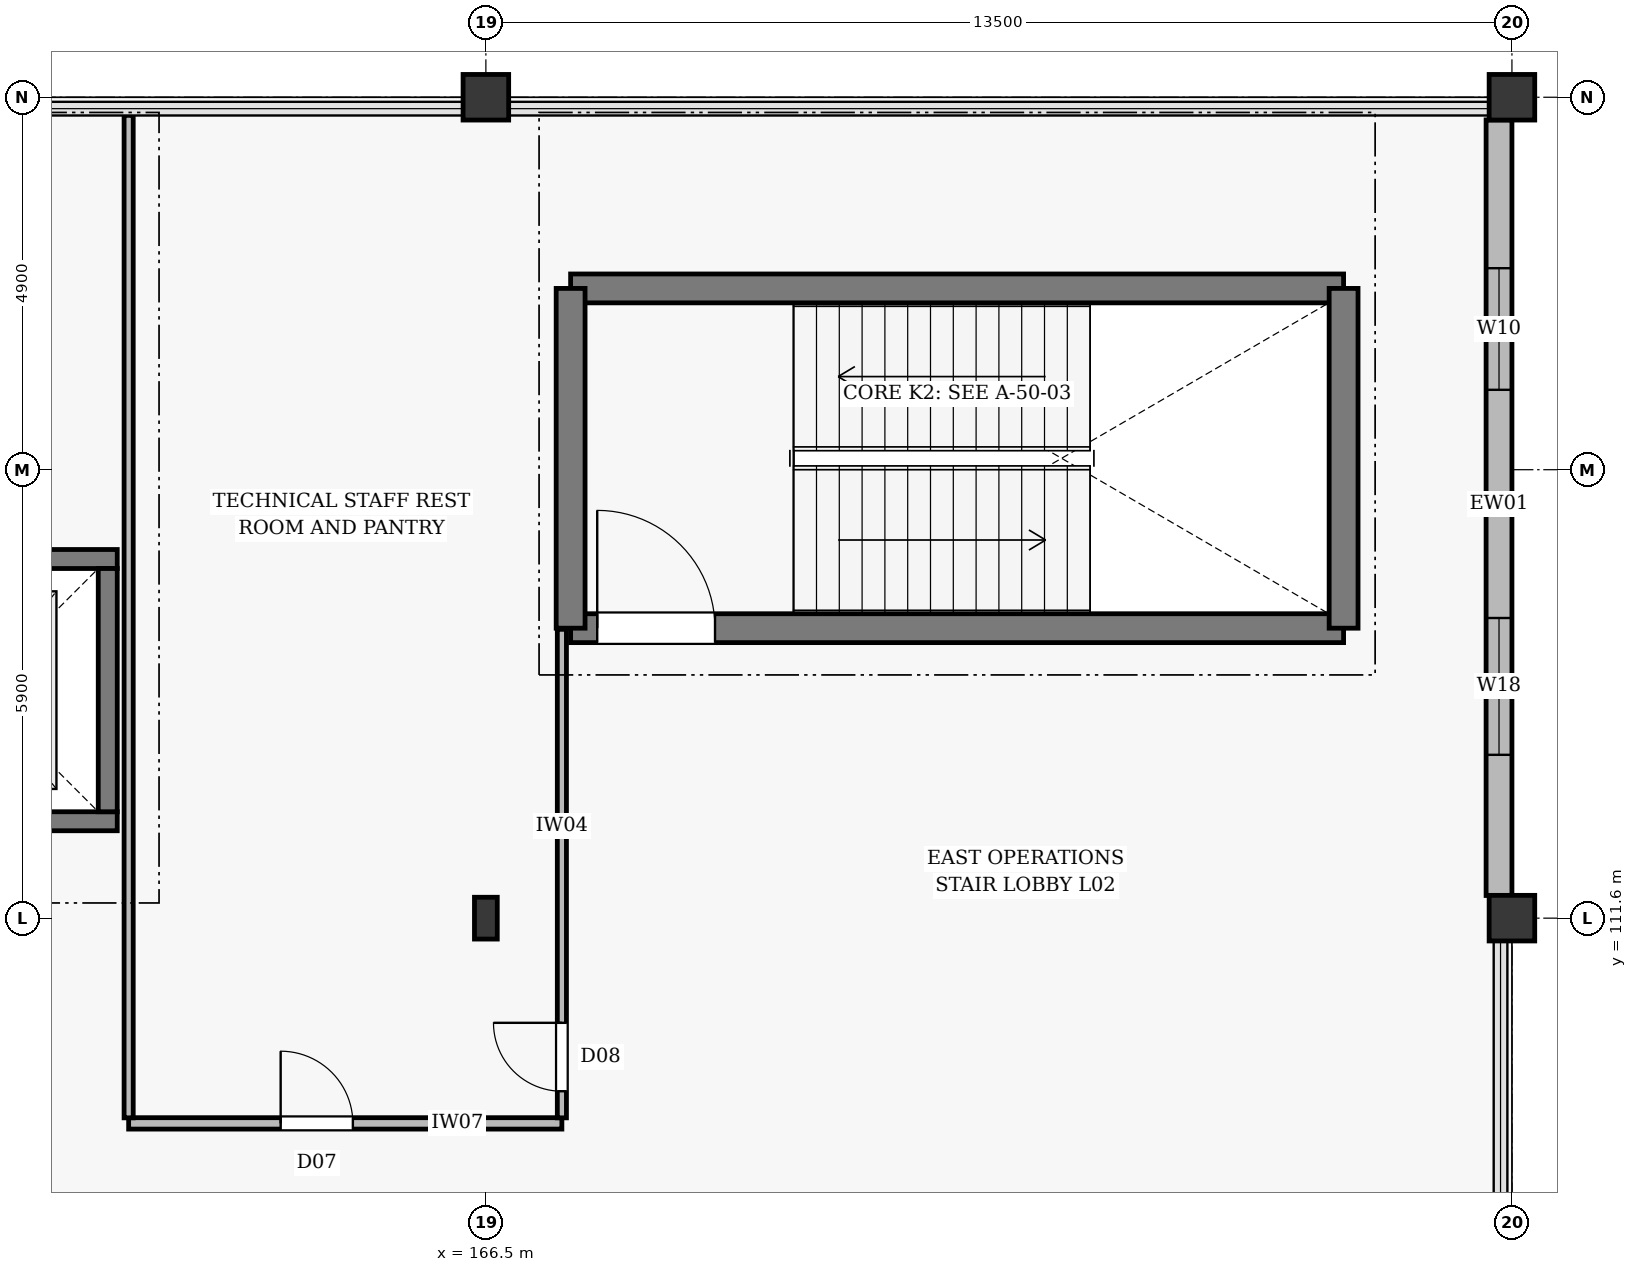
"""IFC4 building model, lengths in metres.
Left out: names, types, materials, properties, quantities, classifications, styles, units other than length and angle.
Written with IfcOpenShell. Run it as: python <this file> out.ifc"""

import sys

from ifc_helpers import new_model, si_unit, direction, frame, frame_2d, origin, origin_2d, place, context, subcontext, project, spatial, rectangle, i_section, extrude, element, fill, save


model = new_model("IFC4")
c1 = context("Model", 3, precision=1e-05, world=origin(), true_north=direction((0.0, 1.0)))
c2 = subcontext(c1, "Body", "Model", "MODEL_VIEW")
j1 = project(units=[si_unit("LENGTHUNIT", "METRE"), si_unit("PLANEANGLEUNIT", "RADIAN")], contexts=[c1])
p1 = place(None, origin())
s1 = spatial("IfcSite", under=j1, at=p1, CompositionType="ELEMENT")
p2 = place(p1, origin())
s2 = spatial("IfcBuilding", under=s1, at=p2, CompositionType="ELEMENT")
p3 = place(p2, frame((0.0, 0.0, 12.6)))
s3 = spatial("IfcBuildingStorey", under=s2, at=p3, CompositionType="ELEMENT", Elevation=12.6)
p4 = place(p3, frame((166.5, 111.6, 0.0), z_axis=(0.0, 0.0, 1.0), x_axis=(1.0, 0.0, 0.0)))
e1 = element("IfcColumn", 1, at=p4, inside=s3, PredefinedType="COLUMN", context=c2, shape_type="SweptSolid", body=[
    extrude(i_section(OverallWidth=0.3, OverallDepth=0.55, WebThickness=0.015, FlangeThickness=0.029, at=origin_2d()), origin(), (0.0, 0.0, 1.0), 4.8),
])
for number, where, z_axis, x_axis in (
    (2, (166.5, 122.4, 0.0), (0.0, 0.0, 1.0), (1.0, 0.0, 0.0)),
    (3, (180.0, 111.6, 0.0), (0.0, 0.0, 1.0), (1.0, 0.0, 0.0)),
    (4, (180.0, 122.4, 0.0), (0.0, 0.0, 1.0), (1.0, 0.0, 0.0)),
):
    element("IfcColumn", number, at=place(p3, frame(where, z_axis=z_axis, x_axis=x_axis)), inside=s3, PredefinedType="COLUMN", context=c2, shape_type="SweptSolid", body=[
        extrude(rectangle(XDim=0.6, YDim=0.6, at=origin_2d()), origin(), (0.0, 0.0, 1.0), 4.8),
    ])
p5 = place(p3, frame((179.83, 122.102, 0.0), z_axis=(0.0, 0.0, 1.0), x_axis=(0.0, -1.0, 0.0)))
e5 = element("IfcWall", 5, at=p5, inside=s3, PredefinedType="STANDARD", context=c2, shape_type="SweptSolid", body=[
    extrude(rectangle(XDim=10.204, YDim=0.34, at=frame_2d((5.102, 0.0))), origin(), (0.0, 0.0, 1.0), 3.9),
])
p6 = place(p5, frame((1.951, 0.0, 0.75)))
e6 = element("IfcOpeningElement", 6, at=p6, cuts=e5, PredefinedType="OPENING", context=c2, shape_type="SweptSolid", body=[
    extrude(rectangle(XDim=1.6, YDim=2.1, at=frame_2d((0.8, 1.05))), frame((0.0, 0.182, 0.0), z_axis=(0.0, -1.0, 0.0), x_axis=(1.0, 0.0, 0.0)), (0.0, 0.0, 1.0), 0.364),
])
p7 = place(p5, frame((6.553, 0.0, 1.05)))
e7 = element("IfcOpeningElement", 7, at=p7, cuts=e5, PredefinedType="OPENING", context=c2, shape_type="SweptSolid", body=[
    extrude(rectangle(XDim=1.8, YDim=1.1, at=frame_2d((0.9, 0.55))), frame((0.0, 0.182, 0.0), z_axis=(0.0, -1.0, 0.0), x_axis=(1.0, 0.0, 0.0)), (0.0, 0.0, 1.0), 0.364),
])
p8 = place(p3, frame((167.615, 115.415, 0.0), z_axis=(0.0, 0.0, 1.0), x_axis=(1.0, 0.0, 0.0)))
e8 = element("IfcWall", 8, at=p8, inside=s3, PredefinedType="SOLIDWALL", context=c2, shape_type="SweptSolid", body=[
    extrude(rectangle(XDim=10.17, YDim=0.38, at=frame_2d((5.085, 0.0))), origin(), (0.0, 0.0, 1.0), 4.8),
])
p9 = place(p8, frame((0.35, 0.0, 0.005)))
e9 = element("IfcOpeningElement", 9, at=p9, cuts=e8, PredefinedType="OPENING", context=c2, shape_type="SweptSolid", body=[
    extrude(rectangle(XDim=1.55, YDim=2.2, at=frame_2d((0.775, 1.1))), frame((0.0, 0.202, 0.0), z_axis=(0.0, -1.0, 0.0), x_axis=(1.0, 0.0, 0.0)), (0.0, 0.0, 1.0), 0.404),
])
p10 = place(p3, frame((167.615, 119.885, 0.0), z_axis=(0.0, 0.0, 1.0), x_axis=(1.0, 0.0, 0.0)))
e10 = element("IfcWall", 10, at=p10, inside=s3, PredefinedType="SOLIDWALL", context=c2, shape_type="SweptSolid", body=[
    extrude(rectangle(XDim=10.17, YDim=0.38, at=frame_2d((5.085, 0.0))), origin(), (0.0, 0.0, 1.0), 4.8),
])
for number, where, z_axis, x_axis in (
    (11, (167.615, 115.415, 0.0), (0.0, 0.0, 1.0), (0.0, 1.0, 0.0)),
    (12, (177.785, 115.415, 0.0), (0.0, 0.0, 1.0), (0.0, 1.0, 0.0)),
):
    element("IfcWall", number, at=place(p3, frame(where, z_axis=z_axis, x_axis=x_axis)), inside=s3, PredefinedType="SOLIDWALL", context=c2, shape_type="SweptSolid", body=[
        extrude(rectangle(XDim=4.47, YDim=0.38, at=frame_2d((2.235, 0.0))), origin(), (0.0, 0.0, 1.0), 4.8),
    ])
p11 = place(p3, frame((157.95, 112.875, 0.0), z_axis=(0.0, 0.0, 1.0), x_axis=(1.0, 0.0, 0.0)))
e13 = element("IfcWall", 13, at=p11, inside=s3, PredefinedType="SOLIDWALL", context=c2, shape_type="SweptSolid", body=[
    extrude(rectangle(XDim=3.7, YDim=0.25, at=frame_2d((1.85, 0.0))), origin(), (0.0, 0.0, 1.0), 4.8),
])
p12 = place(p11, frame((1.225, 0.0, 0.005)))
e14 = element("IfcOpeningElement", 14, at=p12, cuts=e13, PredefinedType="OPENING", context=c2, shape_type="SweptSolid", body=[
    extrude(rectangle(XDim=1.25, YDim=2.2, at=frame_2d((0.625, 1.1))), frame((0.0, 0.137, 0.0), z_axis=(0.0, -1.0, 0.0), x_axis=(1.0, 0.0, 0.0)), (0.0, 0.0, 1.0), 0.274),
])
p13 = place(p3, frame((157.95, 116.325, 0.0), z_axis=(0.0, 0.0, 1.0), x_axis=(1.0, 0.0, 0.0)))
e15 = element("IfcWall", 15, at=p13, inside=s3, PredefinedType="SOLIDWALL", context=c2, shape_type="SweptSolid", body=[
    extrude(rectangle(XDim=3.7, YDim=0.25, at=frame_2d((1.85, 0.0))), origin(), (0.0, 0.0, 1.0), 4.8),
])
p14 = place(p3, frame((161.525, 113.0, 0.0), z_axis=(0.0, 0.0, 1.0), x_axis=(0.0, 1.0, 0.0)))
e16 = element("IfcWall", 16, at=p14, inside=s3, PredefinedType="SOLIDWALL", context=c2, shape_type="SweptSolid", body=[
    extrude(rectangle(XDim=3.2, YDim=0.25, at=frame_2d((1.6, 0.0))), origin(), (0.0, 0.0, 1.0), 4.8),
])
p15 = place(p3, frame((161.8, 108.9, 0.0), z_axis=(0.0, 0.0, 1.0), x_axis=(1.0, 0.0, 0.0)))
e17 = element("IfcWall", 17, at=p15, inside=s3, PredefinedType="PARTITIONING", context=c2, shape_type="SweptSolid", body=[
    extrude(rectangle(XDim=5.7, YDim=0.15, at=frame_2d((2.85, 0.0))), origin(), (0.0, 0.0, 1.0), 4.09),
])
p16 = place(p15, frame((2.0, 0.0, 0.005)))
e18 = element("IfcOpeningElement", 18, at=p16, cuts=e17, PredefinedType="OPENING", context=c2, shape_type="SweptSolid", body=[
    extrude(rectangle(XDim=0.95, YDim=2.1, at=frame_2d((0.475, 1.05))), frame((0.0, 0.087, 0.0), z_axis=(0.0, -1.0, 0.0), x_axis=(1.0, 0.0, 0.0)), (0.0, 0.0, 1.0), 0.174),
])
p17 = place(p3, frame((167.5, 108.973, 0.0), z_axis=(0.0, 0.0, 1.0), x_axis=(0.0, 1.0, 0.0)))
e19 = element("IfcWall", 19, at=p17, inside=s3, PredefinedType="PARTITIONING", context=c2, shape_type="SweptSolid", body=[
    extrude(rectangle(XDim=6.427, YDim=0.12, at=frame_2d((3.213, 0.0))), origin(), (0.0, 0.0, 1.0), 3.99),
])
p18 = place(p17, frame((0.35, 0.0, 0.005)))
e20 = element("IfcOpeningElement", 20, at=p18, cuts=e19, PredefinedType="OPENING", context=c2, shape_type="SweptSolid", body=[
    extrude(rectangle(XDim=0.9, YDim=2.1, at=frame_2d((0.45, 1.05))), frame((0.0, 0.072, 0.0), z_axis=(0.0, -1.0, 0.0), x_axis=(1.0, 0.0, 0.0)), (0.0, 0.0, 1.0), 0.144),
])
p19 = place(p3, frame((161.8, 108.973, 0.0), z_axis=(0.0, 0.0, 1.0), x_axis=(0.0, 1.0, 0.0)))
e21 = element("IfcWall", 21, at=p19, inside=s3, PredefinedType="PARTITIONING", context=c2, shape_type="SweptSolid", body=[
    extrude(rectangle(XDim=13.189, YDim=0.12, at=frame_2d((6.595, 0.0))), origin(), (0.0, 0.0, 1.0), 3.99),
])
p20 = place(p6, origin())
e22 = element("IfcWindow", 22, at=p20, inside=s3, PartitioningType="DOUBLE_PANEL_VERTICAL", PredefinedType="WINDOW", context=c2, shape_type="SweptSolid", body=[
    extrude(rectangle(XDim=1.6, YDim=2.1, at=frame_2d((0.8, 1.05))), frame((0.0, 0.03, 0.0), z_axis=(0.0, -1.0, 0.0), x_axis=(1.0, 0.0, 0.0)), (0.0, 0.0, 1.0), 0.06),
])
fill(e6, e22)
p21 = place(p7, origin())
e23 = element("IfcWindow", 23, at=p21, inside=s3, PartitioningType="DOUBLE_PANEL_VERTICAL", PredefinedType="WINDOW", context=c2, shape_type="SweptSolid", body=[
    extrude(rectangle(XDim=1.8, YDim=1.1, at=frame_2d((0.9, 0.55))), frame((0.0, 0.03, 0.0), z_axis=(0.0, -1.0, 0.0), x_axis=(1.0, 0.0, 0.0)), (0.0, 0.0, 1.0), 0.06),
])
fill(e7, e23)
p22 = place(p9, origin())
e24 = element("IfcDoor", 24, at=p22, inside=s3, OperationType="SINGLE_SWING_LEFT", PredefinedType="DOOR", context=c2, shape_type="SweptSolid", body=[
    extrude(rectangle(XDim=1.55, YDim=2.2, at=frame_2d((0.775, 1.1))), frame((0.0, 0.025, 0.0), z_axis=(0.0, -1.0, 0.0), x_axis=(1.0, 0.0, 0.0)), (0.0, 0.0, 1.0), 0.05),
])
fill(e9, e24)
p23 = place(p16, origin())
e25 = element("IfcDoor", 25, at=p23, inside=s3, OperationType="SINGLE_SWING_LEFT", PredefinedType="DOOR", context=c2, shape_type="SweptSolid", body=[
    extrude(rectangle(XDim=0.95, YDim=2.1, at=frame_2d((0.475, 1.05))), frame((0.0, 0.025, 0.0), z_axis=(0.0, -1.0, 0.0), x_axis=(1.0, 0.0, 0.0)), (0.0, 0.0, 1.0), 0.05),
])
fill(e18, e25)
p24 = place(p18, origin())
e26 = element("IfcDoor", 26, at=p24, inside=s3, OperationType="SINGLE_SWING_RIGHT", PredefinedType="DOOR", context=c2, shape_type="SweptSolid", body=[
    extrude(rectangle(XDim=0.9, YDim=2.1, at=frame_2d((0.45, 1.05))), frame((0.0, 0.025, 0.0), z_axis=(0.0, -1.0, 0.0), x_axis=(1.0, 0.0, 0.0)), (0.0, 0.0, 1.0), 0.05),
])
fill(e20, e26)
save(model, sys.argv[1])
